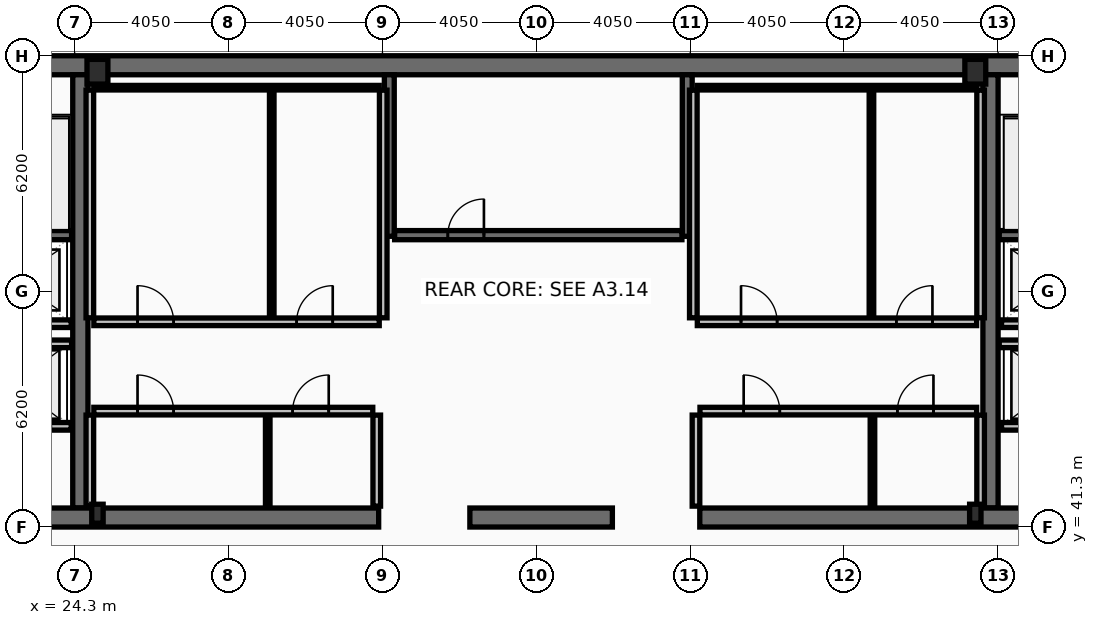
"""IFC4 building model, lengths in metres.
Left out: names, types, materials, properties, quantities, classifications, styles, units other than length and angle.
Written with IfcOpenShell. Run it as: python <this file> out.ifc"""

import sys

from ifc_helpers import new_model, si_unit, direction, frame, frame_2d, origin, origin_2d, place, context, subcontext, project, spatial, rectangle, hollow_rectangle, i_section, extrude, element, fill, save


model = new_model("IFC4")
c1 = context("Model", 3, precision=1e-05, world=origin(), true_north=direction((0.0, 1.0)))
c2 = subcontext(c1, "Body", "Model", "MODEL_VIEW")
j1 = project(units=[si_unit("LENGTHUNIT", "METRE"), si_unit("PLANEANGLEUNIT", "RADIAN")], contexts=[c1])
p1 = place(None, origin())
s1 = spatial("IfcSite", under=j1, at=p1, CompositionType="ELEMENT")
p2 = place(p1, origin())
s2 = spatial("IfcBuilding", under=s1, at=p2, CompositionType="ELEMENT")
p3 = place(p2, frame((0.0, 0.0, 356.2)))
s3 = spatial("IfcBuildingStorey", under=s2, at=p3, CompositionType="ELEMENT", Elevation=356.2)
p4 = place(p3, frame((16.2, 53.45, 0.0), z_axis=(0.0, 0.0, 1.0), x_axis=(1.0, 0.0, 0.0)))
e1 = element("IfcWall", 1, at=p4, inside=s3, PredefinedType="SHEAR", context=c2, shape_type="SweptSolid", body=[
    extrude(rectangle(XDim=40.5, YDim=0.5, at=frame_2d((20.25, 0.0))), origin(), (0.0, 0.0, 1.0), 5.4),
])
for number, where, z_axis, x_axis in (
    (2, (24.45, 41.8, 0.0), (0.0, 0.0, 1.0), (0.0, 1.0, 0.0)),
    (3, (48.4, 41.8, 0.0), (0.0, 0.0, 1.0), (0.0, 1.0, 0.0)),
):
    element("IfcWall", number, at=place(p3, frame(where, z_axis=z_axis, x_axis=x_axis)), inside=s3, PredefinedType="SHEAR", context=c2, shape_type="SweptSolid", body=[
        extrude(rectangle(XDim=11.4, YDim=0.4, at=frame_2d((5.7, 0.0))), origin(), (0.0, 0.0, 1.0), 5.4),
    ])
p5 = place(p3, frame((32.3, 41.55, 0.0), z_axis=(0.0, 0.0, 1.0), x_axis=(-1.0, 0.0, 0.0)))
e4 = element("IfcWall", 4, at=p5, inside=s3, PredefinedType="SHEAR", context=c2, shape_type="SweptSolid", body=[
    extrude(rectangle(XDim=11.45, YDim=0.5, at=frame_2d((5.725, 0.0))), origin(), (0.0, 0.0, 1.0), 5.4),
])
p6 = place(p3, frame((38.45, 41.55, 0.0), z_axis=(0.0, 0.0, 1.0), x_axis=(-1.0, 0.0, 0.0)))
e5 = element("IfcWall", 5, at=p6, inside=s3, PredefinedType="SHEAR", context=c2, shape_type="SweptSolid", body=[
    extrude(rectangle(XDim=3.75, YDim=0.5, at=frame_2d((1.875, 0.0))), origin(), (0.0, 0.0, 1.0), 5.4),
])
p7 = place(p3, frame((52.05, 41.55, 0.0), z_axis=(0.0, 0.0, 1.0), x_axis=(-1.0, 0.0, 0.0)))
e6 = element("IfcWall", 6, at=p7, inside=s3, PredefinedType="SHEAR", context=c2, shape_type="SweptSolid", body=[
    extrude(rectangle(XDim=11.3, YDim=0.5, at=frame_2d((5.65, 0.0))), origin(), (0.0, 0.0, 1.0), 5.4),
])
for number, where, z_axis, x_axis in (
    (7, (32.58, 48.95, 0.0), (0.0, 0.0, 1.0), (0.0, 1.0, 0.0)),
    (8, (40.42, 48.95, 0.0), (0.0, 0.0, 1.0), (0.0, 1.0, 0.0)),
):
    element("IfcWall", number, at=place(p3, frame(where, z_axis=z_axis, x_axis=x_axis)), inside=s3, PredefinedType="SHEAR", context=c2, shape_type="SweptSolid", body=[
        extrude(rectangle(XDim=4.25, YDim=0.26, at=frame_2d((2.125, 0.0))), origin(), (0.0, 0.0, 1.0), 5.4),
    ])
p8 = place(p3, frame((16.7, 48.98, 0.0), z_axis=(0.0, 0.0, 1.0), x_axis=(1.0, 0.0, 0.0)))
e9 = element("IfcWall", 9, at=p8, inside=s3, PredefinedType="SHEAR", context=c2, shape_type="SweptSolid", body=[
    extrude(rectangle(XDim=7.52, YDim=0.24, at=frame_2d((3.76, 0.0))), origin(), (0.0, 0.0, 1.0), 5.4),
])
p9 = place(p8, frame((0.22, 0.0, 0.0)))
e10 = element("IfcOpeningElement", 10, at=p9, cuts=e9, PredefinedType="OPENING", context=c2, shape_type="SweptSolid", body=[
    extrude(rectangle(XDim=1.05, YDim=2.15, at=frame_2d((0.525, 1.075))), frame((0.0, 0.13, 0.0), z_axis=(0.0, -1.0, 0.0), x_axis=(1.0, 0.0, 0.0)), (0.0, 0.0, 1.0), 0.26),
])
p10 = place(p3, frame((48.63, 48.98, 0.0), z_axis=(0.0, 0.0, 1.0), x_axis=(1.0, 0.0, 0.0)))
e11 = element("IfcWall", 11, at=p10, inside=s3, PredefinedType="SHEAR", context=c2, shape_type="SweptSolid", body=[
    extrude(rectangle(XDim=7.57, YDim=0.24, at=frame_2d((3.785, 0.0))), origin(), (0.0, 0.0, 1.0), 5.4),
])
p11 = place(p10, frame((6.3, 0.0, 0.0)))
e12 = element("IfcOpeningElement", 12, at=p11, cuts=e11, PredefinedType="OPENING", context=c2, shape_type="SweptSolid", body=[
    extrude(rectangle(XDim=1.05, YDim=2.15, at=frame_2d((0.525, 1.075))), frame((0.0, 0.13, 0.0), z_axis=(0.0, -1.0, 0.0), x_axis=(1.0, 0.0, 0.0)), (0.0, 0.0, 1.0), 0.26),
])
p12 = place(p3, frame((32.72, 48.98, 0.0), z_axis=(0.0, 0.0, 1.0), x_axis=(1.0, 0.0, 0.0)))
e13 = element("IfcWall", 13, at=p12, inside=s3, PredefinedType="SHEAR", context=c2, shape_type="SweptSolid", body=[
    extrude(rectangle(XDim=7.56, YDim=0.24, at=frame_2d((3.78, 0.0))), origin(), (0.0, 0.0, 1.0), 5.4),
])
p13 = place(p12, frame((1.4, 0.0, 0.0)))
e14 = element("IfcOpeningElement", 14, at=p13, cuts=e13, PredefinedType="OPENING", context=c2, shape_type="SweptSolid", body=[
    extrude(rectangle(XDim=0.95, YDim=2.1, at=frame_2d((0.475, 1.05))), frame((0.0, 0.13, 0.0), z_axis=(0.0, -1.0, 0.0), x_axis=(1.0, 0.0, 0.0)), (0.0, 0.0, 1.0), 0.26),
])
for number, where, z_axis, x_axis in (
    (15, (24.9, 53.28, 0.0), (0.0, 0.0, 1.0), (1.0, 0.0, 0.0)),
    (16, (48.0, 53.28, 0.0), (0.0, 0.0, 1.0), (1.0, 0.0, 0.0)),
):
    element("IfcColumn", number, at=place(p3, frame(where, z_axis=z_axis, x_axis=x_axis)), inside=s3, PredefinedType="COLUMN", context=c2, shape_type="SweptSolid", body=[
        extrude(hollow_rectangle(XDim=0.55, YDim=0.65, WallThickness=0.04, at=origin_2d()), origin(), (0.0, 0.0, 1.0), 5.6),
    ])
for number, where, z_axis, x_axis in (
    (17, (24.9, 41.65, 0.0), (0.0, 0.0, 1.0), (1.0, 0.0, 0.0)),
    (18, (48.0, 41.65, 0.0), (0.0, 0.0, 1.0), (1.0, 0.0, 0.0)),
):
    element("IfcColumn", number, at=place(p3, frame(where, z_axis=z_axis, x_axis=x_axis)), inside=s3, PredefinedType="COLUMN", context=c2, shape_type="SweptSolid", body=[
        extrude(i_section(OverallWidth=0.3, OverallDepth=0.5, WebThickness=0.014, FlangeThickness=0.028, at=origin_2d()), origin(), (0.0, 0.0, 1.0), 5.6),
    ])
p14 = place(p3, frame((51.61, 43.95, 0.0), z_axis=(0.0, 0.0, 1.0), x_axis=(-1.0, 0.0, 0.0)))
e19 = element("IfcWall", 19, at=p14, inside=s3, PredefinedType="PARTITIONING", context=c2, shape_type="SweptSolid", body=[
    extrude(rectangle(XDim=2.92, YDim=0.2, at=frame_2d((1.46, 0.0))), origin(), (0.0, 0.0, 1.0), 5.4),
])
p15 = place(p14, frame((0.81, 0.0, 0.0)))
e20 = element("IfcOpeningElement", 20, at=p15, cuts=e19, PredefinedType="OPENING", context=c2, shape_type="SweptSolid", body=[
    extrude(rectangle(XDim=1.3, YDim=2.18, at=frame_2d((0.65, 1.09))), frame((0.0, 0.11, 0.0), z_axis=(0.0, -1.0, 0.0), x_axis=(1.0, 0.0, 0.0)), (0.0, 0.0, 1.0), 0.22),
])
p16 = place(p3, frame((24.21, 43.95, 0.0), z_axis=(0.0, 0.0, 1.0), x_axis=(-1.0, 0.0, 0.0)))
e21 = element("IfcWall", 21, at=p16, inside=s3, PredefinedType="PARTITIONING", context=c2, shape_type="SweptSolid", body=[
    extrude(rectangle(XDim=2.97, YDim=0.2, at=frame_2d((1.485, 0.0))), origin(), (0.0, 0.0, 1.0), 5.4),
])
p17 = place(p16, frame((0.86, 0.0, 0.0)))
e22 = element("IfcOpeningElement", 22, at=p17, cuts=e21, PredefinedType="OPENING", context=c2, shape_type="SweptSolid", body=[
    extrude(rectangle(XDim=1.3, YDim=2.18, at=frame_2d((0.65, 1.09))), frame((0.0, 0.11, 0.0), z_axis=(0.0, -1.0, 0.0), x_axis=(1.0, 0.0, 0.0)), (0.0, 0.0, 1.0), 0.22),
])
p18 = place(p3, frame((51.61, 46.65, 0.0), z_axis=(0.0, 0.0, 1.0), x_axis=(-1.0, 0.0, 0.0)))
e23 = element("IfcWall", 23, at=p18, inside=s3, PredefinedType="PARTITIONING", context=c2, shape_type="SweptSolid", body=[
    extrude(rectangle(XDim=2.92, YDim=0.2, at=frame_2d((1.46, 0.0))), origin(), (0.0, 0.0, 1.0), 5.4),
])
p19 = place(p18, frame((0.86, 0.0, 0.0)))
e24 = element("IfcOpeningElement", 24, at=p19, cuts=e23, PredefinedType="OPENING", context=c2, shape_type="SweptSolid", body=[
    extrude(rectangle(XDim=1.2, YDim=2.18, at=frame_2d((0.6, 1.09))), frame((0.0, 0.11, 0.0), z_axis=(0.0, -1.0, 0.0), x_axis=(1.0, 0.0, 0.0)), (0.0, 0.0, 1.0), 0.22),
])
p20 = place(p3, frame((24.21, 46.65, 0.0), z_axis=(0.0, 0.0, 1.0), x_axis=(-1.0, 0.0, 0.0)))
e25 = element("IfcWall", 25, at=p20, inside=s3, PredefinedType="PARTITIONING", context=c2, shape_type="SweptSolid", body=[
    extrude(rectangle(XDim=2.97, YDim=0.2, at=frame_2d((1.485, 0.0))), origin(), (0.0, 0.0, 1.0), 5.4),
])
p21 = place(p20, frame((0.91, 0.0, 0.0)))
e26 = element("IfcOpeningElement", 26, at=p21, cuts=e25, PredefinedType="OPENING", context=c2, shape_type="SweptSolid", body=[
    extrude(rectangle(XDim=1.2, YDim=2.18, at=frame_2d((0.6, 1.09))), frame((0.0, 0.11, 0.0), z_axis=(0.0, -1.0, 0.0), x_axis=(1.0, 0.0, 0.0)), (0.0, 0.0, 1.0), 0.22),
])
p22 = place(p3, frame((21.2, 46.12, 0.0), z_axis=(0.0, 0.0, 1.0), x_axis=(1.0, 0.0, 0.0)))
e27 = element("IfcWall", 27, at=p22, inside=s3, PredefinedType="PARTITIONING", context=c2, shape_type="SweptSolid", body=[
    extrude(rectangle(XDim=3.02, YDim=0.2, at=frame_2d((1.51, 0.0))), origin(), (0.0, 0.0, 1.0), 5.4),
])
p23 = place(p3, frame((48.63, 46.12, 0.0), z_axis=(0.0, 0.0, 1.0), x_axis=(1.0, 0.0, 0.0)))
e28 = element("IfcWall", 28, at=p23, inside=s3, PredefinedType="PARTITIONING", context=c2, shape_type="SweptSolid", body=[
    extrude(rectangle(XDim=3.07, YDim=0.2, at=frame_2d((1.535, 0.0))), origin(), (0.0, 0.0, 1.0), 5.4),
])
for number, where, z_axis, x_axis in (
    (29, (24.7, 46.805, 0.0), (0.0, 0.0, 1.0), (0.0, 1.0, 0.0)),
    (30, (32.42, 46.805, 0.0), (0.0, 0.0, 1.0), (0.0, 1.0, 0.0)),
):
    element("IfcWall", number, at=place(p3, frame(where, z_axis=z_axis, x_axis=x_axis)), inside=s3, PredefinedType="PARTITIONING", context=c2, shape_type="SweptSolid", body=[
        extrude(rectangle(XDim=5.99, YDim=0.2, at=frame_2d((2.995, 0.0))), origin(), (0.0, 0.0, 1.0), 5.4),
    ])
p24 = place(p3, frame((24.805, 52.86, 0.0), z_axis=(0.0, 0.0, 1.0), x_axis=(1.0, 0.0, 0.0)))
e31 = element("IfcWall", 31, at=p24, inside=s3, PredefinedType="PARTITIONING", context=c2, shape_type="SweptSolid", body=[
    extrude(rectangle(XDim=7.51, YDim=0.12, at=frame_2d((3.755, 0.0))), origin(), (0.0, 0.0, 1.0), 5.4),
])
p25 = place(p3, frame((29.486, 46.805, 0.0), z_axis=(0.0, 0.0, 1.0), x_axis=(0.0, 1.0, 0.0)))
e32 = element("IfcWall", 32, at=p25, inside=s3, PredefinedType="PARTITIONING", context=c2, shape_type="SweptSolid", body=[
    extrude(rectangle(XDim=5.99, YDim=0.12, at=frame_2d((2.995, 0.0))), origin(), (0.0, 0.0, 1.0), 5.4),
])
p26 = place(p3, frame((24.805, 46.7, 0.0), z_axis=(0.0, 0.0, 1.0), x_axis=(1.0, 0.0, 0.0)))
e33 = element("IfcWall", 33, at=p26, inside=s3, PredefinedType="PARTITIONING", context=c2, shape_type="SweptSolid", body=[
    extrude(rectangle(XDim=7.51, YDim=0.2, at=frame_2d((3.755, 0.0))), origin(), (0.0, 0.0, 1.0), 5.4),
])
p27 = place(p26, frame((1.15, 0.0, 0.0)))
e34 = element("IfcOpeningElement", 34, at=p27, cuts=e33, PredefinedType="OPENING", context=c2, shape_type="SweptSolid", body=[
    extrude(rectangle(XDim=0.95, YDim=2.1, at=frame_2d((0.475, 1.05))), frame((0.0, 0.11, 0.0), z_axis=(0.0, -1.0, 0.0), x_axis=(1.0, 0.0, 0.0)), (0.0, 0.0, 1.0), 0.22),
])
p28 = place(p26, frame((5.336, 0.0, 0.0)))
e35 = element("IfcOpeningElement", 35, at=p28, cuts=e33, PredefinedType="OPENING", context=c2, shape_type="SweptSolid", body=[
    extrude(rectangle(XDim=0.95, YDim=2.1, at=frame_2d((0.475, 1.05))), frame((0.0, 0.11, 0.0), z_axis=(0.0, -1.0, 0.0), x_axis=(1.0, 0.0, 0.0)), (0.0, 0.0, 1.0), 0.22),
])
for number, where, z_axis, x_axis in (
    (36, (24.7, 41.85, 0.0), (0.0, 0.0, 1.0), (0.0, 1.0, 0.0)),
    (37, (32.25, 41.85, 0.0), (0.0, 0.0, 1.0), (0.0, 1.0, 0.0)),
):
    element("IfcWall", number, at=place(p3, frame(where, z_axis=z_axis, x_axis=x_axis)), inside=s3, PredefinedType="PARTITIONING", context=c2, shape_type="SweptSolid", body=[
        extrude(rectangle(XDim=2.395, YDim=0.2, at=frame_2d((1.198, 0.0))), origin(), (0.0, 0.0, 1.0), 5.4),
    ])
p29 = place(p3, frame((29.381, 41.85, 0.0), z_axis=(0.0, 0.0, 1.0), x_axis=(0.0, 1.0, 0.0)))
e38 = element("IfcWall", 38, at=p29, inside=s3, PredefinedType="PARTITIONING", context=c2, shape_type="SweptSolid", body=[
    extrude(rectangle(XDim=2.395, YDim=0.12, at=frame_2d((1.198, 0.0))), origin(), (0.0, 0.0, 1.0), 5.4),
])
p30 = place(p3, frame((24.805, 44.35, 0.0), z_axis=(0.0, 0.0, 1.0), x_axis=(1.0, 0.0, 0.0)))
e39 = element("IfcWall", 39, at=p30, inside=s3, PredefinedType="PARTITIONING", context=c2, shape_type="SweptSolid", body=[
    extrude(rectangle(XDim=7.34, YDim=0.2, at=frame_2d((3.67, 0.0))), origin(), (0.0, 0.0, 1.0), 5.4),
])
p31 = place(p30, frame((1.15, 0.0, 0.0)))
e40 = element("IfcOpeningElement", 40, at=p31, cuts=e39, PredefinedType="OPENING", context=c2, shape_type="SweptSolid", body=[
    extrude(rectangle(XDim=0.95, YDim=2.1, at=frame_2d((0.475, 1.05))), frame((0.0, 0.11, 0.0), z_axis=(0.0, -1.0, 0.0), x_axis=(1.0, 0.0, 0.0)), (0.0, 0.0, 1.0), 0.22),
])
p32 = place(p30, frame((5.231, 0.0, 0.0)))
e41 = element("IfcOpeningElement", 41, at=p32, cuts=e39, PredefinedType="OPENING", context=c2, shape_type="SweptSolid", body=[
    extrude(rectangle(XDim=0.95, YDim=2.1, at=frame_2d((0.475, 1.05))), frame((0.0, 0.11, 0.0), z_axis=(0.0, -1.0, 0.0), x_axis=(1.0, 0.0, 0.0)), (0.0, 0.0, 1.0), 0.22),
])
for number, where, z_axis, x_axis in (
    (42, (40.58, 46.805, 0.0), (0.0, 0.0, 1.0), (0.0, 1.0, 0.0)),
    (43, (48.14, 46.805, 0.0), (0.0, 0.0, 1.0), (0.0, 1.0, 0.0)),
):
    element("IfcWall", number, at=place(p3, frame(where, z_axis=z_axis, x_axis=x_axis)), inside=s3, PredefinedType="PARTITIONING", context=c2, shape_type="SweptSolid", body=[
        extrude(rectangle(XDim=5.99, YDim=0.2, at=frame_2d((2.995, 0.0))), origin(), (0.0, 0.0, 1.0), 5.4),
    ])
p33 = place(p3, frame((40.685, 52.86, 0.0), z_axis=(0.0, 0.0, 1.0), x_axis=(1.0, 0.0, 0.0)))
e44 = element("IfcWall", 44, at=p33, inside=s3, PredefinedType="PARTITIONING", context=c2, shape_type="SweptSolid", body=[
    extrude(rectangle(XDim=7.35, YDim=0.12, at=frame_2d((3.675, 0.0))), origin(), (0.0, 0.0, 1.0), 5.4),
])
p34 = place(p3, frame((45.267, 46.805, 0.0), z_axis=(0.0, 0.0, 1.0), x_axis=(0.0, 1.0, 0.0)))
e45 = element("IfcWall", 45, at=p34, inside=s3, PredefinedType="PARTITIONING", context=c2, shape_type="SweptSolid", body=[
    extrude(rectangle(XDim=5.99, YDim=0.12, at=frame_2d((2.995, 0.0))), origin(), (0.0, 0.0, 1.0), 5.4),
])
p35 = place(p3, frame((40.685, 46.7, 0.0), z_axis=(0.0, 0.0, 1.0), x_axis=(1.0, 0.0, 0.0)))
e46 = element("IfcWall", 46, at=p35, inside=s3, PredefinedType="PARTITIONING", context=c2, shape_type="SweptSolid", body=[
    extrude(rectangle(XDim=7.35, YDim=0.2, at=frame_2d((3.675, 0.0))), origin(), (0.0, 0.0, 1.0), 5.4),
])
p36 = place(p35, frame((1.15, 0.0, 0.0)))
e47 = element("IfcOpeningElement", 47, at=p36, cuts=e46, PredefinedType="OPENING", context=c2, shape_type="SweptSolid", body=[
    extrude(rectangle(XDim=0.95, YDim=2.1, at=frame_2d((0.475, 1.05))), frame((0.0, 0.11, 0.0), z_axis=(0.0, -1.0, 0.0), x_axis=(1.0, 0.0, 0.0)), (0.0, 0.0, 1.0), 0.22),
])
p37 = place(p35, frame((5.237, 0.0, 0.0)))
e48 = element("IfcOpeningElement", 48, at=p37, cuts=e46, PredefinedType="OPENING", context=c2, shape_type="SweptSolid", body=[
    extrude(rectangle(XDim=0.95, YDim=2.1, at=frame_2d((0.475, 1.05))), frame((0.0, 0.11, 0.0), z_axis=(0.0, -1.0, 0.0), x_axis=(1.0, 0.0, 0.0)), (0.0, 0.0, 1.0), 0.22),
])
for number, where, z_axis, x_axis in (
    (49, (40.65, 41.85, 0.0), (0.0, 0.0, 1.0), (0.0, 1.0, 0.0)),
    (50, (48.14, 41.85, 0.0), (0.0, 0.0, 1.0), (0.0, 1.0, 0.0)),
):
    element("IfcWall", number, at=place(p3, frame(where, z_axis=z_axis, x_axis=x_axis)), inside=s3, PredefinedType="PARTITIONING", context=c2, shape_type="SweptSolid", body=[
        extrude(rectangle(XDim=2.395, YDim=0.2, at=frame_2d((1.198, 0.0))), origin(), (0.0, 0.0, 1.0), 5.4),
    ])
p38 = place(p3, frame((45.294, 41.85, 0.0), z_axis=(0.0, 0.0, 1.0), x_axis=(0.0, 1.0, 0.0)))
e51 = element("IfcWall", 51, at=p38, inside=s3, PredefinedType="PARTITIONING", context=c2, shape_type="SweptSolid", body=[
    extrude(rectangle(XDim=2.395, YDim=0.12, at=frame_2d((1.198, 0.0))), origin(), (0.0, 0.0, 1.0), 5.4),
])
p39 = place(p3, frame((40.755, 44.35, 0.0), z_axis=(0.0, 0.0, 1.0), x_axis=(1.0, 0.0, 0.0)))
e52 = element("IfcWall", 52, at=p39, inside=s3, PredefinedType="PARTITIONING", context=c2, shape_type="SweptSolid", body=[
    extrude(rectangle(XDim=7.28, YDim=0.2, at=frame_2d((3.64, 0.0))), origin(), (0.0, 0.0, 1.0), 5.4),
])
p40 = place(p39, frame((1.15, 0.0, 0.0)))
e53 = element("IfcOpeningElement", 53, at=p40, cuts=e52, PredefinedType="OPENING", context=c2, shape_type="SweptSolid", body=[
    extrude(rectangle(XDim=0.95, YDim=2.1, at=frame_2d((0.475, 1.05))), frame((0.0, 0.11, 0.0), z_axis=(0.0, -1.0, 0.0), x_axis=(1.0, 0.0, 0.0)), (0.0, 0.0, 1.0), 0.22),
])
p41 = place(p39, frame((5.194, 0.0, 0.0)))
e54 = element("IfcOpeningElement", 54, at=p41, cuts=e52, PredefinedType="OPENING", context=c2, shape_type="SweptSolid", body=[
    extrude(rectangle(XDim=0.95, YDim=2.1, at=frame_2d((0.475, 1.05))), frame((0.0, 0.11, 0.0), z_axis=(0.0, -1.0, 0.0), x_axis=(1.0, 0.0, 0.0)), (0.0, 0.0, 1.0), 0.22),
])
p42 = place(p13, origin())
e55 = element("IfcDoor", 55, at=p42, inside=s3, OperationType="SINGLE_SWING_RIGHT", PredefinedType="DOOR", context=c2, shape_type="SweptSolid", body=[
    extrude(rectangle(XDim=0.95, YDim=2.1, at=frame_2d((0.475, 1.05))), frame((0.0, 0.025, 0.0), z_axis=(0.0, -1.0, 0.0), x_axis=(1.0, 0.0, 0.0)), (0.0, 0.0, 1.0), 0.05),
])
fill(e14, e55)
p43 = place(p27, origin())
e56 = element("IfcDoor", 56, at=p43, inside=s3, OperationType="SINGLE_SWING_LEFT", PredefinedType="DOOR", context=c2, shape_type="SweptSolid", body=[
    extrude(rectangle(XDim=0.95, YDim=2.1, at=frame_2d((0.475, 1.05))), frame((0.0, 0.025, 0.0), z_axis=(0.0, -1.0, 0.0), x_axis=(1.0, 0.0, 0.0)), (0.0, 0.0, 1.0), 0.05),
])
fill(e34, e56)
p44 = place(p28, origin())
e57 = element("IfcDoor", 57, at=p44, inside=s3, OperationType="SINGLE_SWING_RIGHT", PredefinedType="DOOR", context=c2, shape_type="SweptSolid", body=[
    extrude(rectangle(XDim=0.95, YDim=2.1, at=frame_2d((0.475, 1.05))), frame((0.0, 0.025, 0.0), z_axis=(0.0, -1.0, 0.0), x_axis=(1.0, 0.0, 0.0)), (0.0, 0.0, 1.0), 0.05),
])
fill(e35, e57)
p45 = place(p31, origin())
e58 = element("IfcDoor", 58, at=p45, inside=s3, OperationType="SINGLE_SWING_LEFT", PredefinedType="DOOR", context=c2, shape_type="SweptSolid", body=[
    extrude(rectangle(XDim=0.95, YDim=2.1, at=frame_2d((0.475, 1.05))), frame((0.0, 0.025, 0.0), z_axis=(0.0, -1.0, 0.0), x_axis=(1.0, 0.0, 0.0)), (0.0, 0.0, 1.0), 0.05),
])
fill(e40, e58)
p46 = place(p32, origin())
e59 = element("IfcDoor", 59, at=p46, inside=s3, OperationType="SINGLE_SWING_RIGHT", PredefinedType="DOOR", context=c2, shape_type="SweptSolid", body=[
    extrude(rectangle(XDim=0.95, YDim=2.1, at=frame_2d((0.475, 1.05))), frame((0.0, 0.025, 0.0), z_axis=(0.0, -1.0, 0.0), x_axis=(1.0, 0.0, 0.0)), (0.0, 0.0, 1.0), 0.05),
])
fill(e41, e59)
p47 = place(p36, origin())
e60 = element("IfcDoor", 60, at=p47, inside=s3, OperationType="SINGLE_SWING_LEFT", PredefinedType="DOOR", context=c2, shape_type="SweptSolid", body=[
    extrude(rectangle(XDim=0.95, YDim=2.1, at=frame_2d((0.475, 1.05))), frame((0.0, 0.025, 0.0), z_axis=(0.0, -1.0, 0.0), x_axis=(1.0, 0.0, 0.0)), (0.0, 0.0, 1.0), 0.05),
])
fill(e47, e60)
p48 = place(p37, origin())
e61 = element("IfcDoor", 61, at=p48, inside=s3, OperationType="SINGLE_SWING_RIGHT", PredefinedType="DOOR", context=c2, shape_type="SweptSolid", body=[
    extrude(rectangle(XDim=0.95, YDim=2.1, at=frame_2d((0.475, 1.05))), frame((0.0, 0.025, 0.0), z_axis=(0.0, -1.0, 0.0), x_axis=(1.0, 0.0, 0.0)), (0.0, 0.0, 1.0), 0.05),
])
fill(e48, e61)
p49 = place(p40, origin())
e62 = element("IfcDoor", 62, at=p49, inside=s3, OperationType="SINGLE_SWING_LEFT", PredefinedType="DOOR", context=c2, shape_type="SweptSolid", body=[
    extrude(rectangle(XDim=0.95, YDim=2.1, at=frame_2d((0.475, 1.05))), frame((0.0, 0.025, 0.0), z_axis=(0.0, -1.0, 0.0), x_axis=(1.0, 0.0, 0.0)), (0.0, 0.0, 1.0), 0.05),
])
fill(e53, e62)
p50 = place(p41, origin())
e63 = element("IfcDoor", 63, at=p50, inside=s3, OperationType="SINGLE_SWING_RIGHT", PredefinedType="DOOR", context=c2, shape_type="SweptSolid", body=[
    extrude(rectangle(XDim=0.95, YDim=2.1, at=frame_2d((0.475, 1.05))), frame((0.0, 0.025, 0.0), z_axis=(0.0, -1.0, 0.0), x_axis=(1.0, 0.0, 0.0)), (0.0, 0.0, 1.0), 0.05),
])
fill(e54, e63)
save(model, sys.argv[1])
